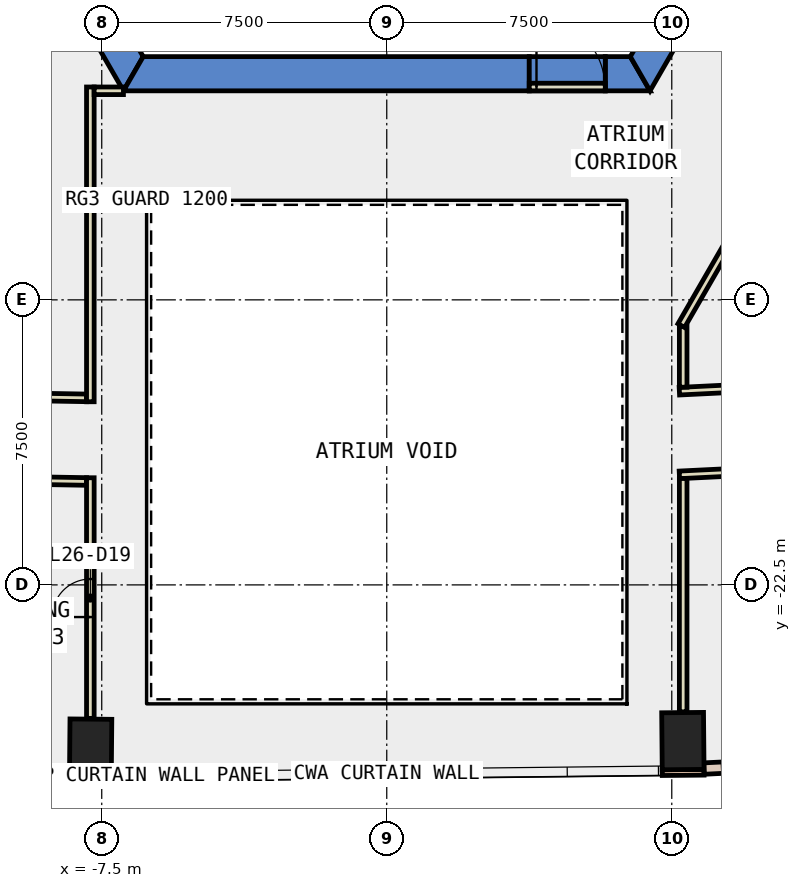
"""IFC4 building model, lengths in metres.
Left out: names, types, materials, properties, quantities, classifications, styles, units other than length and angle.
Written with IfcOpenShell. Run it as: python <this file> out.ifc"""

import sys

from ifc_helpers import new_model, si_unit, direction, frame, frame_2d, origin, origin_2d, place, context, subcontext, project, spatial, polyline, rectangle, outline, extrude, element, fill, save


model = new_model("IFC4")
c1 = context("Model", 3, precision=1e-05, world=origin(), true_north=direction((0.0, 1.0)))
c2 = subcontext(c1, "Body", "Model", "MODEL_VIEW")
j1 = project(units=[si_unit("LENGTHUNIT", "METRE"), si_unit("PLANEANGLEUNIT", "RADIAN")], contexts=[c1])
p1 = place(None, origin())
s1 = spatial("IfcSite", under=j1, at=p1, CompositionType="ELEMENT")
p2 = place(p1, origin())
s2 = spatial("IfcBuilding", under=s1, at=p2, CompositionType="ELEMENT")
p3 = place(p2, frame((0.0, 0.0, 120.2)))
s3 = spatial("IfcBuildingStorey", under=s2, at=p3, CompositionType="ELEMENT", Elevation=120.2)
for number, where, z_axis, x_axis in (
    (1, (-7.792, -26.782, -0.4), (0.0, 0.0, 1.0), (-1.0, 0.009, 0.0)),
    (2, (7.792, -26.61, -0.4), (0.0, 0.0, 1.0), (1.0, 0.009, 0.0)),
):
    element("IfcColumn", number, at=place(p3, frame(where, z_axis=z_axis, x_axis=x_axis)), inside=s3, PredefinedType="COLUMN", context=c2, shape_type="SweptSolid", body=[
        extrude(rectangle(XDim=1.1, YDim=1.5, at=origin_2d()), origin(), (0.0, 0.0, 1.0), 4.2),
    ])
p4 = place(p3, frame((0.0, 0.0, -0.4)))
e3 = element("IfcWall", 3, at=p4, inside=s3, PredefinedType="SHEAR", context=c2, shape_type="SweptSolid", body=[
    extrude(outline(polyline([(-13.856, 2.5), (-6.928, -9.5), (-6.409, -8.6), (-12.817, 2.5), (-13.856, 2.5)])), origin(), (0.0, 0.0, 1.0), 4.2),
])
p5 = place(p3, frame((0.0, 0.0, -0.4)))
e4 = element("IfcWall", 4, at=p5, inside=s3, PredefinedType="SHEAR", context=c2, shape_type="SweptSolid", body=[
    extrude(outline(polyline([(3.75, -9.5), (3.75, -8.6), (-6.409, -8.6), (-6.928, -9.5), (3.75, -9.5)])), origin(), (0.0, 0.0, 1.0), 4.2),
])
p6 = place(p3, frame((0.0, 0.0, -0.4)))
e5 = element("IfcWall", 5, at=p6, inside=s3, PredefinedType="SHEAR", context=c2, shape_type="SweptSolid", body=[
    extrude(outline(polyline([(5.75, -8.6), (5.75, -9.5), (6.928, -9.5), (6.409, -8.6), (5.75, -8.6)])), origin(), (0.0, 0.0, 1.0), 4.2),
])
p7 = place(p3, frame((0.0, 0.0, 3.6)))
e6 = element("IfcWall", 6, at=p7, inside=s3, PredefinedType="SHEAR", context=c2, shape_type="SweptSolid", body=[
    extrude(outline(polyline([(5.75, -9.5), (5.75, -8.6), (3.75, -8.6), (3.75, -9.5), (5.75, -9.5)])), origin(), (0.0, 0.0, 1.0), 0.2),
])
p8 = place(p3, frame((0.0, 0.0, -0.4)))
e7 = element("IfcWall", 7, at=p8, inside=s3, PredefinedType="SHEAR", context=c2, shape_type="SweptSolid", body=[
    extrude(outline(polyline([(8.117, -7.44), (7.338, -6.99), (6.409, -8.6), (6.928, -9.5), (8.117, -7.44)])), origin(), (0.0, 0.0, 1.0), 4.2),
])
for number, where, z_axis, x_axis in (
    (8, (-8.349, -27.602, 0.0), (0.0, 0.0, 1.0), (1.0, -0.009, 0.0)),
    (9, (7.249, -27.44, 0.0), (0.0, 0.0, 1.0), (1.0, 0.009, 0.0)),
):
    element("IfcWall", number, at=place(p3, frame(where, z_axis=z_axis, x_axis=x_axis)), inside=s3, PredefinedType="STANDARD", context=c2, shape_type="SweptSolid", body=[
        extrude(rectangle(XDim=1.1, YDim=0.15, at=frame_2d((0.55, 0.0))), origin(), (0.0, 0.0, 1.0), 3.8),
    ])
p9 = place(p3, frame((-14.242, -27.421, 0.0), z_axis=(0.0, 0.0, 1.0), x_axis=(0.999850142513, -0.017311629508, 0.0)))
e10 = element("IfcWall", 10, at=p9, inside=s3, PredefinedType="STANDARD", context=c2, shape_type="SweptSolid", body=[
    extrude(rectangle(XDim=5.895, YDim=0.3, at=frame_2d((2.948, 0.0))), origin(), (0.0, 0.0, 1.0), 3.8),
])
p10 = place(p9, frame((0.474, 0.0, 0.9)))
e11 = element("IfcOpeningElement", 11, at=p10, cuts=e10, PredefinedType="OPENING", context=c2, shape_type="SweptSolid", body=[
    extrude(rectangle(XDim=2.0, YDim=2.6, at=frame_2d((1.0, 1.3))), frame((0.0, 0.16, 0.0), z_axis=(0.0, -1.0, 0.0), x_axis=(1.0, 0.0, 0.0)), (0.0, 0.0, 1.0), 0.32),
])
p11 = place(p9, frame((3.421, 0.0, 0.9)))
e12 = element("IfcOpeningElement", 12, at=p11, cuts=e10, PredefinedType="OPENING", context=c2, shape_type="SweptSolid", body=[
    extrude(rectangle(XDim=2.0, YDim=2.6, at=frame_2d((1.0, 1.3))), frame((0.0, 0.16, 0.0), z_axis=(0.0, -1.0, 0.0), x_axis=(1.0, 0.0, 0.0)), (0.0, 0.0, 1.0), 0.32),
])
p12 = place(p3, frame((8.347, -27.333, 0.0), z_axis=(0.0, 0.0, 1.0), x_axis=(0.998800343021, 0.048968099633, 0.0)))
e13 = element("IfcWall", 13, at=p12, inside=s3, PredefinedType="STANDARD", context=c2, shape_type="SweptSolid", body=[
    extrude(rectangle(XDim=5.903, YDim=0.3, at=frame_2d((2.952, 0.0))), origin(), (0.0, 0.0, 1.0), 3.8),
])
p13 = place(p12, frame((0.476, 0.0, 0.9)))
e14 = element("IfcOpeningElement", 14, at=p13, cuts=e13, PredefinedType="OPENING", context=c2, shape_type="SweptSolid", body=[
    extrude(rectangle(XDim=2.0, YDim=2.6, at=frame_2d((1.0, 1.3))), frame((0.0, 0.16, 0.0), z_axis=(0.0, -1.0, 0.0), x_axis=(1.0, 0.0, 0.0)), (0.0, 0.0, 1.0), 0.32),
])
p14 = place(p12, frame((3.427, 0.0, 0.9)))
e15 = element("IfcOpeningElement", 15, at=p14, cuts=e13, PredefinedType="OPENING", context=c2, shape_type="SweptSolid", body=[
    extrude(rectangle(XDim=2.0, YDim=2.6, at=frame_2d((1.0, 1.3))), frame((0.0, 0.16, 0.0), z_axis=(0.0, -1.0, 0.0), x_axis=(1.0, 0.0, 0.0)), (0.0, 0.0, 1.0), 0.32),
])
p15 = place(p3, frame((7.7, -17.403, 0.0), z_axis=(0.0, 0.0, 1.0), x_axis=(0.998792748077, 0.049122768543, 0.0)))
e16 = element("IfcWall", 16, at=p15, inside=s3, PredefinedType="PARTITIONING", context=c2, shape_type="SweptSolid", body=[
    extrude(rectangle(XDim=6.62, YDim=0.2, at=frame_2d((3.31, 0.0))), origin(), (0.0, 0.0, 1.0), 3.8),
])
p16 = place(p3, frame((-14.569, -17.464, 0.0), z_axis=(0.0, 0.0, 1.0), x_axis=(0.999851389672, -0.017239448129, 0.0)))
e17 = element("IfcWall", 17, at=p16, inside=s3, PredefinedType="PARTITIONING", context=c2, shape_type="SweptSolid", body=[
    extrude(rectangle(XDim=6.67, YDim=0.2, at=frame_2d((3.335, 0.0))), origin(), (0.0, 0.0, 1.0), 3.8),
])
p17 = place(p3, frame((14.418, -19.276, 0.0), z_axis=(0.0, 0.0, 1.0), x_axis=(-0.998802248261, -0.04892922305, 0.0)))
e18 = element("IfcWall", 18, at=p17, inside=s3, PredefinedType="PARTITIONING", context=c2, shape_type="SweptSolid", body=[
    extrude(rectangle(XDim=6.726, YDim=0.2, at=frame_2d((3.363, 0.0))), origin(), (0.0, 0.0, 1.0), 3.8),
])
p18 = place(p3, frame((-7.9, -19.779, 0.0), z_axis=(0.0, 0.0, 1.0), x_axis=(-0.999851582532, 0.017228259004, 0.0)))
e19 = element("IfcWall", 19, at=p18, inside=s3, PredefinedType="PARTITIONING", context=c2, shape_type="SweptSolid", body=[
    extrude(rectangle(XDim=3.188, YDim=0.2, at=frame_2d((1.594, 0.0))), origin(), (0.0, 0.0, 1.0), 3.8),
])
p19 = place(p3, frame((7.8, -15.69, 0.0), z_axis=(0.0, 0.0, 1.0), x_axis=(0.0, -1.0, 0.0)))
e20 = element("IfcWall", 20, at=p19, inside=s3, PredefinedType="PARTITIONING", context=c2, shape_type="SweptSolid", body=[
    extrude(rectangle(XDim=1.608, YDim=0.2, at=frame_2d((0.804, 0.0))), origin(), (0.0, 0.0, 1.0), 3.8),
])
p20 = place(p3, frame((-7.8, -17.681, 0.0), z_axis=(0.0, 0.0, 1.0), x_axis=(0.0, 1.0, 0.0)))
e21 = element("IfcWall", 21, at=p20, inside=s3, PredefinedType="PARTITIONING", context=c2, shape_type="SweptSolid", body=[
    extrude(rectangle(XDim=8.282, YDim=0.2, at=frame_2d((4.141, 0.0))), origin(), (0.0, 0.0, 1.0), 3.8),
])
p21 = place(p3, frame((-7.7, -9.499, 0.0), z_axis=(0.0, 0.0, 1.0), x_axis=(1.0, 0.0, 0.0)))
e22 = element("IfcWall", 22, at=p21, inside=s3, PredefinedType="PARTITIONING", context=c2, shape_type="SweptSolid", body=[
    extrude(rectangle(XDim=0.771, YDim=0.2, at=frame_2d((0.385, 0.0))), origin(), (0.0, 0.0, 1.0), 3.8),
])
p22 = place(p3, frame((7.8, -19.701, 0.0), z_axis=(0.0, 0.0, 1.0), x_axis=(0.0, -1.0, 0.0)))
e23 = element("IfcWall", 23, at=p22, inside=s3, PredefinedType="PARTITIONING", context=c2, shape_type="SweptSolid", body=[
    extrude(rectangle(XDim=6.139, YDim=0.2, at=frame_2d((3.07, 0.0))), origin(), (0.0, 0.0, 1.0), 3.8),
])
p23 = place(p3, frame((-7.8, -26.012, 0.0), z_axis=(0.0, 0.0, 1.0), x_axis=(0.0, 1.0, 0.0)))
e24 = element("IfcWall", 24, at=p23, inside=s3, PredefinedType="PARTITIONING", context=c2, shape_type="SweptSolid", body=[
    extrude(rectangle(XDim=6.331, YDim=0.2, at=frame_2d((3.166, 0.0))), origin(), (0.0, 0.0, 1.0), 3.8),
])
p24 = place(p23, frame((2.666, 0.0, 0.0)))
e25 = element("IfcOpeningElement", 25, at=p24, cuts=e24, PredefinedType="OPENING", context=c2, shape_type="SweptSolid", body=[
    extrude(rectangle(XDim=1.0, YDim=2.1, at=frame_2d((0.5, 1.05))), frame((0.0, 0.11, 0.0), z_axis=(0.0, -1.0, 0.0), x_axis=(1.0, 0.0, 0.0)), (0.0, 0.0, 1.0), 0.22),
])
p25 = place(p3, frame((3.75, -9.4, 0.0), z_axis=(0.0, 0.0, 1.0), x_axis=(1.0, 0.0, 0.0)))
e26 = element("IfcWall", 26, at=p25, inside=s3, PredefinedType="PARTITIONING", context=c2, shape_type="SweptSolid", body=[
    extrude(rectangle(XDim=2.0, YDim=0.2, at=frame_2d((1.0, 0.0))), origin(), (0.0, 0.0, 1.0), 2.4),
])
p26 = place(p25, frame((0.19, 0.0, 0.0)))
e27 = element("IfcOpeningElement", 27, at=p26, cuts=e26, PredefinedType="OPENING", context=c2, shape_type="SweptSolid", body=[
    extrude(rectangle(XDim=1.8, YDim=2.1, at=frame_2d((0.9, 1.05))), frame((0.0, 0.11, 0.0), z_axis=(0.0, -1.0, 0.0), x_axis=(1.0, 0.0, 0.0)), (0.0, 0.0, 1.0), 0.22),
])
p27 = place(p3, frame((12.401, -7.621, 0.0), z_axis=(0.0, 0.0, 1.0), x_axis=(-0.499983724212, -0.866034800411, 0.0)))
e28 = element("IfcWall", 28, at=p27, inside=s3, PredefinedType="PARTITIONING", context=c2, shape_type="SweptSolid", body=[
    extrude(rectangle(XDim=9.302, YDim=0.2, at=frame_2d((4.651, 0.0))), origin(), (0.0, 0.0, 1.0), 3.8),
])
p28 = place(p24, origin())
e29 = element("IfcDoor", 29, at=p28, inside=s3, OperationType="SINGLE_SWING_LEFT", PredefinedType="DOOR", context=c2, shape_type="SweptSolid", body=[
    extrude(rectangle(XDim=1.0, YDim=2.1, at=frame_2d((0.5, 1.05))), frame((0.0, 0.025, 0.0), z_axis=(0.0, -1.0, 0.0), x_axis=(1.0, 0.0, 0.0)), (0.0, 0.0, 1.0), 0.05),
])
fill(e25, e29)
p29 = place(p26, origin())
e30 = element("IfcDoor", 30, at=p29, inside=s3, OperationType="DOUBLE_DOOR_SINGLE_SWING", PredefinedType="DOOR", context=c2, shape_type="SweptSolid", body=[
    extrude(rectangle(XDim=1.8, YDim=2.1, at=frame_2d((0.9, 1.05))), frame((0.0, 0.025, 0.0), z_axis=(0.0, -1.0, 0.0), x_axis=(1.0, 0.0, 0.0)), (0.0, 0.0, 1.0), 0.05),
])
fill(e27, e30)
save(model, sys.argv[1])
